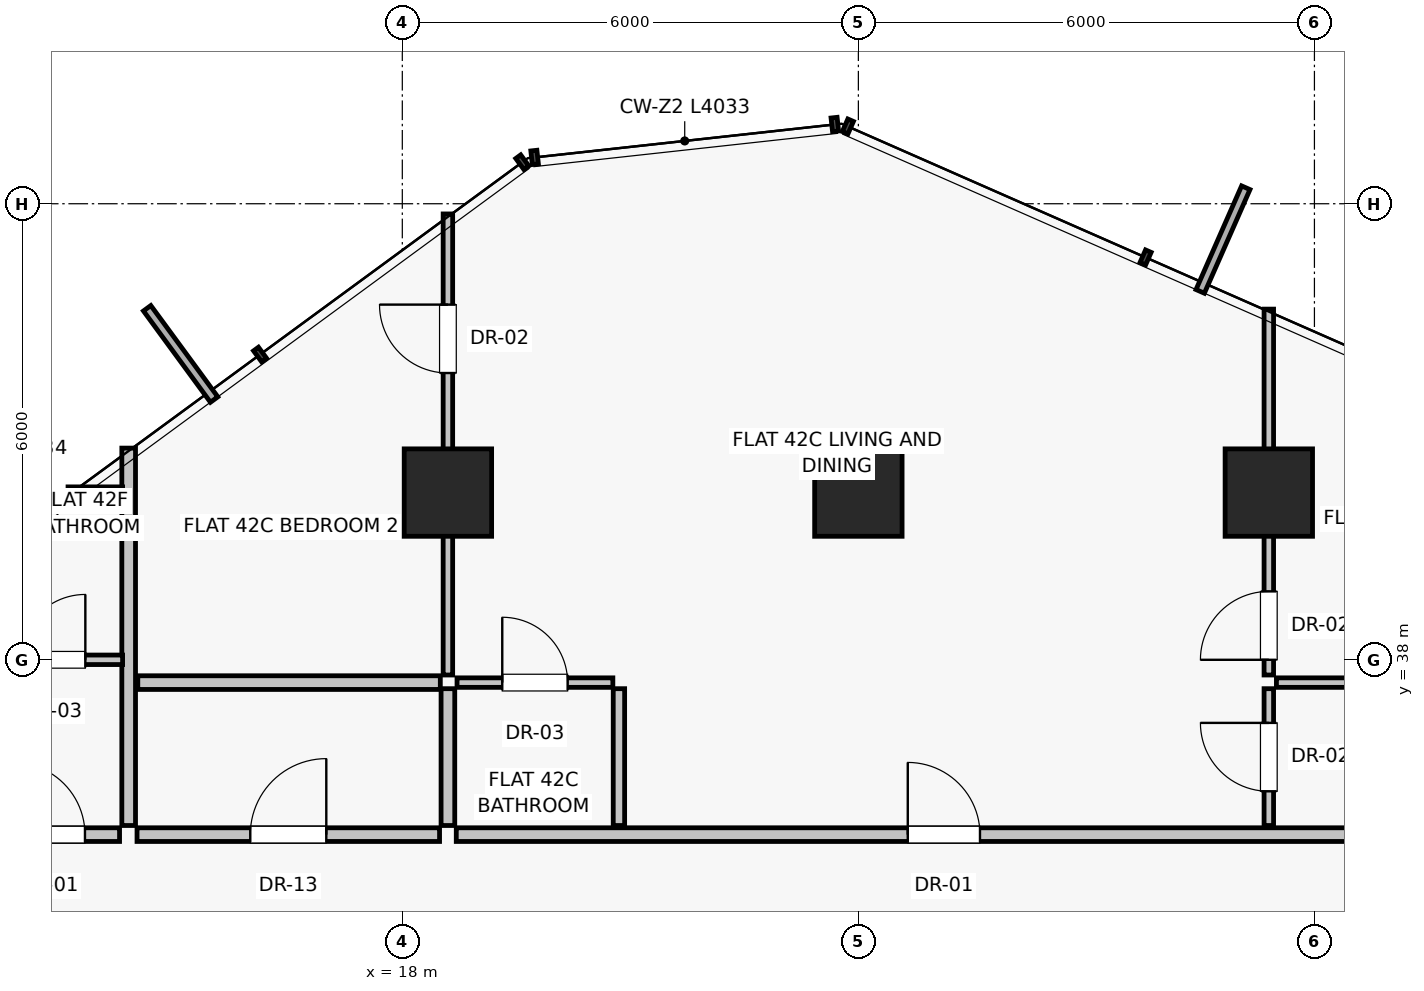
"""IFC4 building model, lengths in metres.
Left out: names, types, materials, properties, quantities, classifications, styles, units other than length and angle.
Written with IfcOpenShell. Run it as: python <this file> out.ifc"""

import sys

from ifc_helpers import new_model, si_unit, direction, frame, frame_2d, origin, origin_2d, place, context, subcontext, project, spatial, rectangle, extrude, source, transform, mapped, element, fill, save


model = new_model("IFC4")
c1 = context("Model", 3, precision=1e-05, world=origin(), true_north=direction((0.0, 1.0)))
c2 = subcontext(c1, "Body", "Model", "MODEL_VIEW")
j1 = project(units=[si_unit("LENGTHUNIT", "METRE"), si_unit("PLANEANGLEUNIT", "RADIAN")], contexts=[c1])
p1 = place(None, origin())
s1 = spatial("IfcSite", under=j1, at=p1, CompositionType="ELEMENT")
p2 = place(p1, origin())
s2 = spatial("IfcBuilding", under=s1, at=p2, CompositionType="ELEMENT")
p3 = place(p2, frame((0.0, 0.0, 149.0)))
s3 = spatial("IfcBuildingStorey", under=s2, at=p3, CompositionType="ELEMENT", Elevation=149.0)
for number, where, z_axis, x_axis in (
    (1, (29.4, 40.2, 0.0), (0.0, 0.0, 1.0), (1.0, 0.0, 0.0)),
    (2, (24.0, 40.2, 0.0), (0.0, 0.0, 1.0), (1.0, 0.0, 0.0)),
    (3, (18.6, 40.2, 0.0), (0.0, 0.0, 1.0), (1.0, 0.0, 0.0)),
):
    element("IfcColumn", number, at=place(p3, frame(where, z_axis=z_axis, x_axis=x_axis)), inside=s3, PredefinedType="COLUMN", context=c2, shape_type="SweptSolid", body=[
        extrude(rectangle(XDim=1.15, YDim=1.15, at=origin_2d()), origin(), (0.0, 0.0, 1.0), 3.25),
    ])
p4 = place(p3, frame((14.4, 35.82, 0.0), z_axis=(0.0, 0.0, 1.0), x_axis=(0.0, 1.0, 0.0)))
e4 = element("IfcWall", 4, at=p4, inside=s3, PredefinedType="PARTITIONING", context=c2, shape_type="SweptSolid", body=[
    extrude(rectangle(XDim=4.965, YDim=0.18, at=frame_2d((2.482, 0.0))), origin(), (0.0, 0.0, 1.0), 3.0),
])
p5 = place(p3, frame((14.51, 35.7, 0.0), z_axis=(0.0, 0.0, 1.0), x_axis=(1.0, 0.0, 0.0)))
e5 = element("IfcWall", 5, at=p5, inside=s3, PredefinedType="PARTITIONING", context=c2, shape_type="SweptSolid", body=[
    extrude(rectangle(XDim=3.98, YDim=0.18, at=frame_2d((1.99, 0.0))), origin(), (0.0, 0.0, 1.0), 2.58),
])
p6 = place(p5, frame((1.49, 0.0, 0.0)))
e6 = element("IfcOpeningElement", 6, at=p6, cuts=e5, PredefinedType="OPENING", context=c2, shape_type="SweptSolid", body=[
    extrude(rectangle(XDim=1.0, YDim=2.01, at=frame_2d((0.5, 1.005))), frame((0.0, 0.1, 0.0), z_axis=(0.0, -1.0, 0.0), x_axis=(1.0, 0.0, 0.0)), (0.0, 0.0, 1.0), 0.2),
])
p7 = place(p3, frame((18.71, 35.7, 0.0), z_axis=(0.0, 0.0, 1.0), x_axis=(1.0, 0.0, 0.0)))
e7 = element("IfcWall", 7, at=p7, inside=s3, PredefinedType="PARTITIONING", context=c2, shape_type="SweptSolid", body=[
    extrude(rectangle(XDim=14.78, YDim=0.18, at=frame_2d((7.39, 0.0))), origin(), (0.0, 0.0, 1.0), 2.58),
])
p8 = place(p7, frame((5.94, 0.0, 0.0)))
e8 = element("IfcOpeningElement", 8, at=p8, cuts=e7, PredefinedType="OPENING", context=c2, shape_type="SweptSolid", body=[
    extrude(rectangle(XDim=0.95, YDim=2.02, at=frame_2d((0.475, 1.01))), frame((0.0, 0.1, 0.0), z_axis=(0.0, -1.0, 0.0), x_axis=(1.0, 0.0, 0.0)), (0.0, 0.0, 1.0), 0.2),
])
p9 = place(p3, frame((14.52, 37.7, 0.0), z_axis=(0.0, 0.0, 1.0), x_axis=(1.0, 0.0, 0.0)))
e9 = element("IfcWall", 9, at=p9, inside=s3, PredefinedType="PARTITIONING", context=c2, shape_type="SweptSolid", body=[
    extrude(rectangle(XDim=3.98, YDim=0.18, at=frame_2d((1.99, 0.0))), origin(), (0.0, 0.0, 1.0), 3.0),
])
p10 = place(p3, frame((18.6, 35.82, 0.0), z_axis=(0.0, 0.0, 1.0), x_axis=(0.0, 1.0, 0.0)))
e10 = element("IfcWall", 10, at=p10, inside=s3, PredefinedType="PARTITIONING", context=c2, shape_type="SweptSolid", body=[
    extrude(rectangle(XDim=1.8, YDim=0.18, at=frame_2d((0.9, 0.0))), origin(), (0.0, 0.0, 1.0), 2.378),
])
p11 = place(p3, frame((18.6, 37.8, 0.0), z_axis=(0.0, 0.0, 1.0), x_axis=(0.0, 1.0, 0.0)))
e11 = element("IfcWall", 11, at=p11, inside=s3, PredefinedType="PARTITIONING", context=c2, shape_type="SweptSolid", body=[
    extrude(rectangle(XDim=6.066, YDim=0.125, at=frame_2d((3.033, 0.0))), origin(), (0.0, 0.0, 1.0), 2.378),
])
p12 = place(p11, frame((3.973, 0.0, 0.0)))
e12 = element("IfcOpeningElement", 12, at=p12, cuts=e11, PredefinedType="OPENING", context=c2, shape_type="SweptSolid", body=[
    extrude(rectangle(XDim=0.9, YDim=2.01, at=frame_2d((0.45, 1.005))), frame((0.0, 0.073, 0.0), z_axis=(0.0, -1.0, 0.0), x_axis=(1.0, 0.0, 0.0)), (0.0, 0.0, 1.0), 0.145),
])
p13 = place(p3, frame((20.85, 35.82, 0.0), z_axis=(0.0, 0.0, 1.0), x_axis=(0.0, 1.0, 0.0)))
e13 = element("IfcWall", 13, at=p13, inside=s3, PredefinedType="PARTITIONING", context=c2, shape_type="SweptSolid", body=[
    extrude(rectangle(XDim=1.8, YDim=0.15, at=frame_2d((0.9, 0.0))), origin(), (0.0, 0.0, 1.0), 3.0),
])
p14 = place(p3, frame((18.72, 37.7, 0.0), z_axis=(0.0, 0.0, 1.0), x_axis=(1.0, 0.0, 0.0)))
e14 = element("IfcWall", 14, at=p14, inside=s3, PredefinedType="PARTITIONING", context=c2, shape_type="SweptSolid", body=[
    extrude(rectangle(XDim=2.05, YDim=0.125, at=frame_2d((1.025, 0.0))), origin(), (0.0, 0.0, 1.0), 3.0),
])
p15 = place(p14, frame((0.595, 0.0, 0.0)))
e15 = element("IfcOpeningElement", 15, at=p15, cuts=e14, PredefinedType="OPENING", context=c2, shape_type="SweptSolid", body=[
    extrude(rectangle(XDim=0.86, YDim=2.01, at=frame_2d((0.43, 1.005))), frame((0.0, 0.073, 0.0), z_axis=(0.0, -1.0, 0.0), x_axis=(1.0, 0.0, 0.0)), (0.0, 0.0, 1.0), 0.145),
])
p16 = place(p3, frame((29.4, 35.82, 0.0), z_axis=(0.0, 0.0, 1.0), x_axis=(0.0, 1.0, 0.0)))
e16 = element("IfcWall", 16, at=p16, inside=s3, PredefinedType="PARTITIONING", context=c2, shape_type="SweptSolid", body=[
    extrude(rectangle(XDim=1.8, YDim=0.125, at=frame_2d((0.9, 0.0))), origin(), (0.0, 0.0, 1.0), 2.378),
])
p17 = place(p16, frame((0.45, 0.0, 0.0)))
e17 = element("IfcOpeningElement", 17, at=p17, cuts=e16, PredefinedType="OPENING", context=c2, shape_type="SweptSolid", body=[
    extrude(rectangle(XDim=0.9, YDim=2.01, at=frame_2d((0.45, 1.005))), frame((0.0, 0.073, 0.0), z_axis=(0.0, -1.0, 0.0), x_axis=(1.0, 0.0, 0.0)), (0.0, 0.0, 1.0), 0.145),
])
p18 = place(p3, frame((29.5, 37.7, 0.0), z_axis=(0.0, 0.0, 1.0), x_axis=(1.0, 0.0, 0.0)))
e18 = element("IfcWall", 18, at=p18, inside=s3, PredefinedType="PARTITIONING", context=c2, shape_type="SweptSolid", body=[
    extrude(rectangle(XDim=3.98, YDim=0.125, at=frame_2d((1.99, 0.0))), origin(), (0.0, 0.0, 1.0), 3.0),
])
p19 = place(p3, frame((29.4, 37.8, 0.0), z_axis=(0.0, 0.0, 1.0), x_axis=(0.0, 1.0, 0.0)))
e19 = element("IfcWall", 19, at=p19, inside=s3, PredefinedType="PARTITIONING", context=c2, shape_type="SweptSolid", body=[
    extrude(rectangle(XDim=4.813, YDim=0.125, at=frame_2d((2.407, 0.0))), origin(), (0.0, 0.0, 1.0), 2.378),
])
p20 = place(p19, frame((0.2, 0.0, 0.0)))
e20 = element("IfcOpeningElement", 20, at=p20, cuts=e19, PredefinedType="OPENING", context=c2, shape_type="SweptSolid", body=[
    extrude(rectangle(XDim=0.9, YDim=2.01, at=frame_2d((0.45, 1.005))), frame((0.0, 0.073, 0.0), z_axis=(0.0, -1.0, 0.0), x_axis=(1.0, 0.0, 0.0)), (0.0, 0.0, 1.0), 0.145),
])
p21 = place(p3, frame((12.42, 35.7, 0.0), z_axis=(0.0, 0.0, 1.0), x_axis=(1.0, 0.0, 0.0)))
e21 = element("IfcWall", 21, at=p21, inside=s3, PredefinedType="PARTITIONING", context=c2, shape_type="SweptSolid", body=[
    extrude(rectangle(XDim=1.86, YDim=0.18, at=frame_2d((0.93, 0.0))), origin(), (0.0, 0.0, 1.0), 3.0),
])
p22 = place(p21, frame((0.455, 0.0, 0.0)))
e22 = element("IfcOpeningElement", 22, at=p22, cuts=e21, PredefinedType="OPENING", context=c2, shape_type="SweptSolid", body=[
    extrude(rectangle(XDim=0.95, YDim=2.02, at=frame_2d((0.475, 1.01))), frame((0.0, 0.1, 0.0), z_axis=(0.0, -1.0, 0.0), x_axis=(1.0, 0.0, 0.0)), (0.0, 0.0, 1.0), 0.2),
])
p23 = place(p3, frame((12.48, 38.0, 0.0), z_axis=(0.0, 0.0, 1.0), x_axis=(1.0, 0.0, 0.0)))
e23 = element("IfcWall", 23, at=p23, inside=s3, PredefinedType="PARTITIONING", context=c2, shape_type="SweptSolid", body=[
    extrude(rectangle(XDim=1.84, YDim=0.125, at=frame_2d((0.92, 0.0))), origin(), (0.0, 0.0, 1.0), 3.0),
])
p24 = place(p23, frame((0.49, 0.0, 0.0)))
e24 = element("IfcOpeningElement", 24, at=p24, cuts=e23, PredefinedType="OPENING", context=c2, shape_type="SweptSolid", body=[
    extrude(rectangle(XDim=0.86, YDim=2.01, at=frame_2d((0.43, 1.005))), frame((0.0, 0.073, 0.0), z_axis=(0.0, -1.0, 0.0), x_axis=(1.0, 0.0, 0.0)), (0.0, 0.0, 1.0), 0.145),
])
p25 = place(p3, frame((13.602, 40.2, 0.0), z_axis=(0.0, 0.0, 1.0), x_axis=(1.0, 0.0, 0.0)))
e25 = element("IfcWall", 25, at=p25, inside=s3, PredefinedType="PARTITIONING", context=c2, shape_type="SweptSolid", body=[
    extrude(rectangle(XDim=0.718, YDim=0.15, at=frame_2d((0.359, 0.0))), origin(), (0.0, 0.0, 1.0), 3.0),
])
m1 = source(origin(), c2, "Body", "SweptSolid", [
    extrude(rectangle(XDim=1.0, YDim=2.01, at=frame_2d((0.5, 1.005))), frame((0.0, 0.025, 0.0), z_axis=(0.0, -1.0, 0.0), x_axis=(1.0, 0.0, 0.0)), (0.0, 0.0, 1.0), 0.05),
])
p26 = place(p6, origin())
e26 = element("IfcDoor", 26, at=p26, inside=s3, OperationType="SINGLE_SWING_RIGHT", PredefinedType="DOOR", context=c2, shape_type="MappedRepresentation", body=[
    mapped(m1, transform((0.0, 0.0, 0.0), scale=1.0)),
])
fill(e6, e26)
m2 = source(origin(), c2, "Body", "SweptSolid", [
    extrude(rectangle(XDim=0.95, YDim=2.02, at=frame_2d((0.475, 1.01))), frame((0.0, 0.025, 0.0), z_axis=(0.0, -1.0, 0.0), x_axis=(1.0, 0.0, 0.0)), (0.0, 0.0, 1.0), 0.05),
])
p27 = place(p8, origin())
e27 = element("IfcDoor", 27, at=p27, inside=s3, OperationType="SINGLE_SWING_LEFT", PredefinedType="DOOR", context=c2, shape_type="MappedRepresentation", body=[
    mapped(m2, transform((0.0, 0.0, 0.0), scale=1.0)),
])
fill(e8, e27)
m3 = source(origin(), c2, "Body", "SweptSolid", [
    extrude(rectangle(XDim=0.9, YDim=2.01, at=frame_2d((0.45, 1.005))), frame((0.0, 0.025, 0.0), z_axis=(0.0, -1.0, 0.0), x_axis=(1.0, 0.0, 0.0)), (0.0, 0.0, 1.0), 0.05),
])
p28 = place(p12, origin())
e28 = element("IfcDoor", 28, at=p28, inside=s3, OperationType="SINGLE_SWING_RIGHT", PredefinedType="DOOR", context=c2, shape_type="MappedRepresentation", body=[
    mapped(m3, transform((0.0, 0.0, 0.0), scale=1.0)),
])
fill(e12, e28)
m4 = source(origin(), c2, "Body", "SweptSolid", [
    extrude(rectangle(XDim=0.86, YDim=2.01, at=frame_2d((0.43, 1.005))), frame((0.0, 0.025, 0.0), z_axis=(0.0, -1.0, 0.0), x_axis=(1.0, 0.0, 0.0)), (0.0, 0.0, 1.0), 0.05),
])
p29 = place(p15, origin())
e29 = element("IfcDoor", 29, at=p29, inside=s3, OperationType="SINGLE_SWING_LEFT", PredefinedType="DOOR", context=c2, shape_type="MappedRepresentation", body=[
    mapped(m4, transform((0.0, 0.0, 0.0), scale=1.0)),
])
fill(e15, e29)
p30 = place(p17, origin())
e30 = element("IfcDoor", 30, at=p30, inside=s3, OperationType="SINGLE_SWING_RIGHT", PredefinedType="DOOR", context=c2, shape_type="MappedRepresentation", body=[
    mapped(m3, transform((0.0, 0.0, 0.0), scale=1.0)),
])
fill(e17, e30)
p31 = place(p20, origin())
e31 = element("IfcDoor", 31, at=p31, inside=s3, OperationType="SINGLE_SWING_LEFT", PredefinedType="DOOR", context=c2, shape_type="MappedRepresentation", body=[
    mapped(m3, transform((0.0, 0.0, 0.0), scale=1.0)),
])
fill(e20, e31)
p32 = place(p22, origin())
e32 = element("IfcDoor", 32, at=p32, inside=s3, OperationType="SINGLE_SWING_LEFT", PredefinedType="DOOR", context=c2, shape_type="MappedRepresentation", body=[
    mapped(m2, transform((0.0, 0.0, 0.0), scale=1.0)),
])
fill(e22, e32)
p33 = place(p24, origin())
e33 = element("IfcDoor", 33, at=p33, inside=s3, OperationType="SINGLE_SWING_RIGHT", PredefinedType="DOOR", context=c2, shape_type="MappedRepresentation", body=[
    mapped(m4, transform((0.0, 0.0, 0.0), scale=1.0)),
])
fill(e24, e33)
save(model, sys.argv[1])
